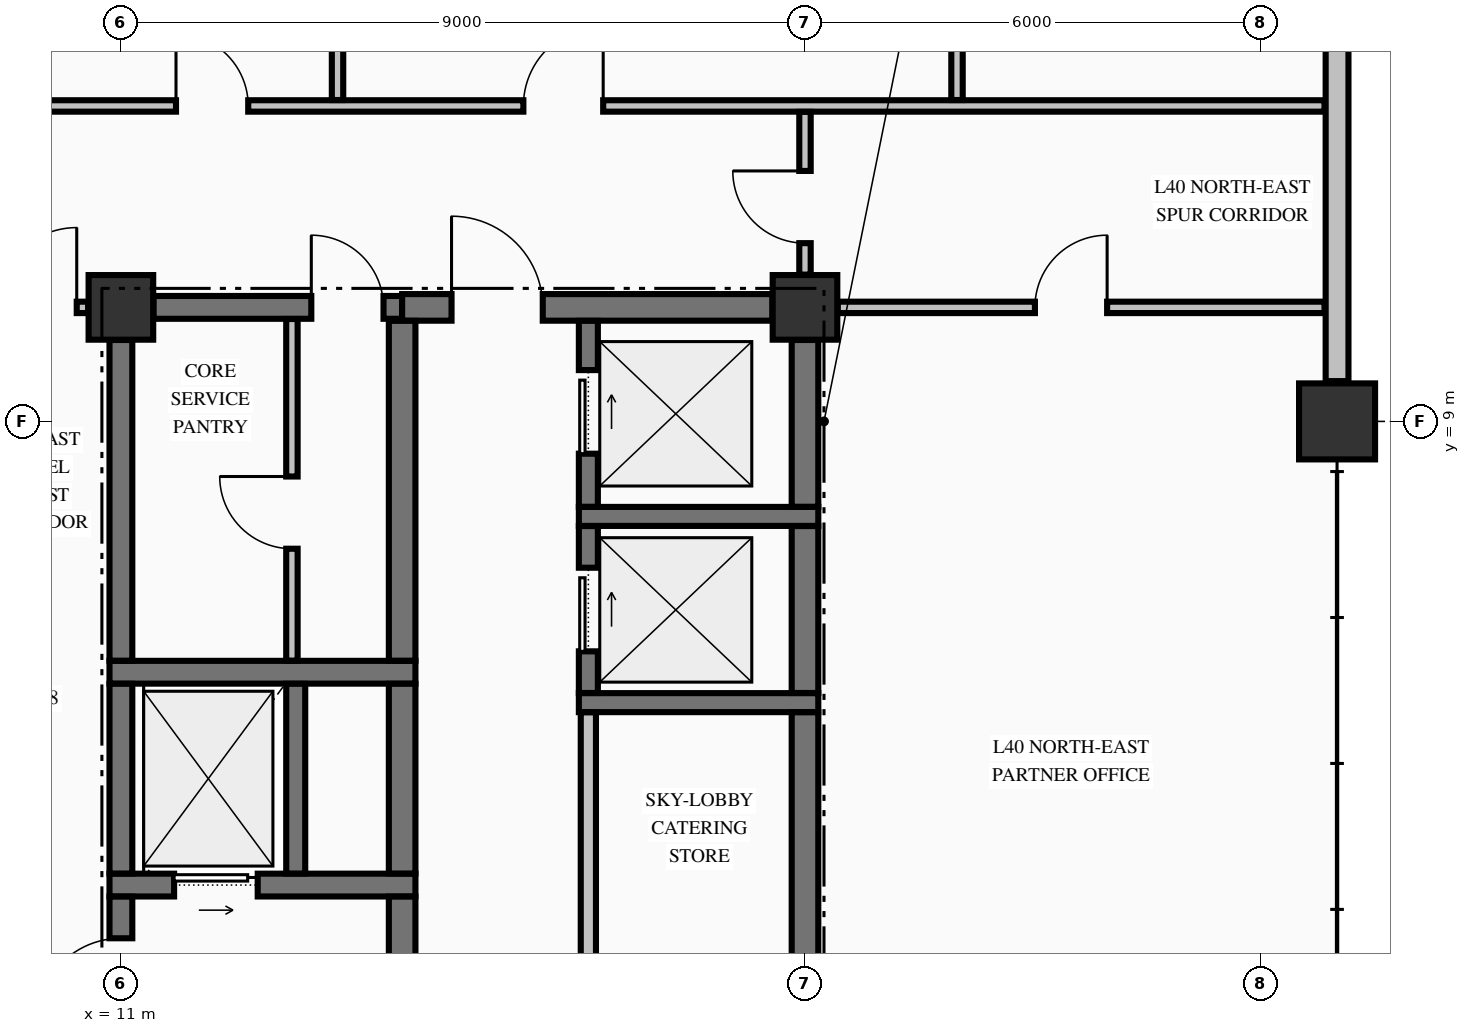
"""IFC4 building model, lengths in metres.
Left out: names, types, materials, properties, quantities, classifications, styles, units other than length and angle.
Written with IfcOpenShell. Run it as: python <this file> out.ifc"""

import sys

from ifc_helpers import new_model, si_unit, direction, frame, frame_2d, origin, origin_2d, place, context, subcontext, project, spatial, rectangle, extrude, element, fill, save


model = new_model("IFC4")
c1 = context("Model", 3, precision=1e-05, world=origin(), true_north=direction((0.0, 1.0)))
c2 = subcontext(c1, "Body", "Model", "MODEL_VIEW")
j1 = project(units=[si_unit("LENGTHUNIT", "METRE"), si_unit("PLANEANGLEUNIT", "RADIAN")], contexts=[c1])
p1 = place(None, origin())
s1 = spatial("IfcSite", under=j1, at=p1, CompositionType="ELEMENT")
p2 = place(p1, origin())
s2 = spatial("IfcBuilding", under=s1, at=p2, CompositionType="ELEMENT")
p3 = place(p2, frame((0.0, 0.0, 158.24)))
s3 = spatial("IfcBuildingStorey", under=s2, at=p3, CompositionType="ELEMENT", Elevation=158.24)
p4 = place(p3, frame((27.0, 9.0, -0.425), z_axis=(0.0, 0.0, 1.0), x_axis=(1.0, 0.0, 0.0)))
e1 = element("IfcColumn", 1, at=p4, inside=s3, PredefinedType="COLUMN", context=c2, shape_type="SweptSolid", body=[
    extrude(rectangle(XDim=1.0, YDim=1.0, at=origin_2d()), origin(), (0.0, 0.0, 1.0), 4.595),
])
for number, where, z_axis, x_axis in (
    (2, (11.0, 10.5, -0.425), (0.0, 0.0, 1.0), (1.0, 0.0, 0.0)),
    (3, (20.0, 10.5, -0.425), (0.0, 0.0, 1.0), (1.0, 0.0, 0.0)),
):
    element("IfcColumn", number, at=place(p3, frame(where, z_axis=z_axis, x_axis=x_axis)), inside=s3, PredefinedType="COLUMN", context=c2, shape_type="SweptSolid", body=[
        extrude(rectangle(XDim=0.85, YDim=0.85, at=origin_2d()), origin(), (0.0, 0.0, 1.0), 4.595),
    ])
p5 = place(p3, frame((27.0, 9.53, 0.0), z_axis=(0.0, 0.0, 1.0), x_axis=(0.0, 1.0, 0.0)))
e4 = element("IfcWall", 4, at=p5, inside=s3, PredefinedType="STANDARD", context=c2, shape_type="SweptSolid", body=[
    extrude(rectangle(XDim=9.44, YDim=0.3, at=frame_2d((4.72, 0.0))), origin(), (0.0, 0.0, 1.0), 1.962),
])
p6 = place(p3, frame((10.85, 2.9, 0.0), z_axis=(0.0, 0.0, 1.0), x_axis=(1.0, 0.0, 0.0)))
e5 = element("IfcWall", 5, at=p6, inside=s3, PredefinedType="SHEAR", context=c2, shape_type="SweptSolid", body=[
    extrude(rectangle(XDim=4.025, YDim=0.3, at=frame_2d((2.012, 0.0))), origin(), (0.0, 0.0, 1.0), 4.17),
])
p7 = place(p6, frame((0.85, 0.0, 0.0)))
e6 = element("IfcOpeningElement", 6, at=p7, cuts=e5, PredefinedType="OPENING", context=c2, shape_type="SweptSolid", body=[
    extrude(rectangle(XDim=1.1, YDim=2.2, at=frame_2d((0.55, 1.1))), frame((0.0, 0.16, 0.0), z_axis=(0.0, -1.0, 0.0), x_axis=(1.0, 0.0, 0.0)), (0.0, 0.0, 1.0), 0.32),
])
p8 = place(p3, frame((17.025, 5.3, 0.0), z_axis=(0.0, 0.0, 1.0), x_axis=(1.0, 0.0, 0.0)))
e7 = element("IfcWall", 7, at=p8, inside=s3, PredefinedType="SOLIDWALL", context=c2, shape_type="SweptSolid", body=[
    extrude(rectangle(XDim=3.15, YDim=0.25, at=frame_2d((1.575, 0.0))), origin(), (0.0, 0.0, 1.0), 4.17),
])
p9 = place(p3, frame((10.85, 5.7, 0.0), z_axis=(0.0, 0.0, 1.0), x_axis=(1.0, 0.0, 0.0)))
e8 = element("IfcWall", 8, at=p9, inside=s3, PredefinedType="SHEAR", context=c2, shape_type="SweptSolid", body=[
    extrude(rectangle(XDim=4.025, YDim=0.3, at=frame_2d((2.012, 0.0))), origin(), (0.0, 0.0, 1.0), 4.17),
])
p10 = place(p3, frame((17.025, 7.75, 0.0), z_axis=(0.0, 0.0, 1.0), x_axis=(1.0, 0.0, 0.0)))
e9 = element("IfcWall", 9, at=p10, inside=s3, PredefinedType="SOLIDWALL", context=c2, shape_type="SweptSolid", body=[
    extrude(rectangle(XDim=3.15, YDim=0.25, at=frame_2d((1.575, 0.0))), origin(), (0.0, 0.0, 1.0), 4.17),
])
p11 = place(p3, frame((11.429, 10.5, 0.0), z_axis=(0.0, 0.0, 1.0), x_axis=(1.0, 0.0, 0.0)))
e10 = element("IfcWall", 10, at=p11, inside=s3, PredefinedType="SHEAR", context=c2, shape_type="SweptSolid", body=[
    extrude(rectangle(XDim=3.271, YDim=0.3, at=frame_2d((1.635, 0.0))), origin(), (0.0, 0.0, 1.0), 4.17),
])
p12 = place(p11, frame((2.076, 0.0, 0.0)))
e11 = element("IfcOpeningElement", 11, at=p12, cuts=e10, PredefinedType="OPENING", context=c2, shape_type="SweptSolid", body=[
    extrude(rectangle(XDim=0.95, YDim=2.15, at=frame_2d((0.475, 1.075))), frame((0.0, 0.16, 0.0), z_axis=(0.0, -1.0, 0.0), x_axis=(1.0, 0.0, 0.0)), (0.0, 0.0, 1.0), 0.32),
])
p13 = place(p3, frame((14.7, 10.5, 0.0), z_axis=(0.0, 0.0, 1.0), x_axis=(1.0, 0.0, 0.0)))
e12 = element("IfcWall", 12, at=p13, inside=s3, PredefinedType="SHEAR", context=c2, shape_type="SweptSolid", body=[
    extrude(rectangle(XDim=4.871, YDim=0.35, at=frame_2d((2.436, 0.0))), origin(), (0.0, 0.0, 1.0), 4.17),
])
p14 = place(p13, frame((0.65, 0.0, 0.0)))
e13 = element("IfcOpeningElement", 13, at=p14, cuts=e12, PredefinedType="OPENING", context=c2, shape_type="SweptSolid", body=[
    extrude(rectangle(XDim=1.2, YDim=2.15, at=frame_2d((0.6, 1.075))), frame((0.0, 0.185, 0.0), z_axis=(0.0, -1.0, 0.0), x_axis=(1.0, 0.0, 0.0)), (0.0, 0.0, 1.0), 0.37),
])
p15 = place(p3, frame((-10.569, 10.5, 0.0), z_axis=(0.0, 0.0, 1.0), x_axis=(1.0, 0.0, 0.0)))
e14 = element("IfcWall", 14, at=p15, inside=s3, PredefinedType="PARTITIONING", context=c2, shape_type="SweptSolid", body=[
    extrude(rectangle(XDim=21.138, YDim=0.15, at=frame_2d((10.569, 0.0))), origin(), (0.0, 0.0, 1.0), 4.17),
])
p16 = place(p15, frame((0.15, 0.0, 0.0)))
e15 = element("IfcOpeningElement", 15, at=p16, cuts=e14, PredefinedType="OPENING", context=c2, shape_type="SweptSolid", body=[
    extrude(rectangle(XDim=1.05, YDim=2.15, at=frame_2d((0.525, 1.075))), frame((0.0, 0.085, 0.0), z_axis=(0.0, -1.0, 0.0), x_axis=(1.0, 0.0, 0.0)), (0.0, 0.0, 1.0), 0.17),
])
p17 = place(p15, frame((19.938, 0.0, 0.0)))
e16 = element("IfcOpeningElement", 16, at=p17, cuts=e14, PredefinedType="OPENING", context=c2, shape_type="SweptSolid", body=[
    extrude(rectangle(XDim=1.05, YDim=2.15, at=frame_2d((0.525, 1.075))), frame((0.0, 0.085, 0.0), z_axis=(0.0, -1.0, 0.0), x_axis=(1.0, 0.0, 0.0)), (0.0, 0.0, 1.0), 0.17),
])
p18 = place(p3, frame((20.431, 10.5, 0.0), z_axis=(0.0, 0.0, 1.0), x_axis=(1.0, 0.0, 0.0)))
e17 = element("IfcWall", 17, at=p18, inside=s3, PredefinedType="PARTITIONING", context=c2, shape_type="SweptSolid", body=[
    extrude(rectangle(XDim=6.404, YDim=0.15, at=frame_2d((3.202, 0.0))), origin(), (0.0, 0.0, 1.0), 4.17),
])
p19 = place(p18, frame((2.594, 0.0, 0.0)))
e18 = element("IfcOpeningElement", 18, at=p19, cuts=e17, PredefinedType="OPENING", context=c2, shape_type="SweptSolid", body=[
    extrude(rectangle(XDim=0.95, YDim=2.15, at=frame_2d((0.475, 1.075))), frame((0.0, 0.085, 0.0), z_axis=(0.0, -1.0, 0.0), x_axis=(1.0, 0.0, 0.0)), (0.0, 0.0, 1.0), 0.17),
])
p20 = place(p3, frame((-20.075, 13.15, 0.0), z_axis=(0.0, 0.0, 1.0), x_axis=(1.0, 0.0, 0.0)))
e19 = element("IfcWall", 19, at=p20, inside=s3, PredefinedType="PARTITIONING", context=c2, shape_type="SweptSolid", body=[
    extrude(rectangle(XDim=46.91, YDim=0.15, at=frame_2d((23.455, 0.0))), origin(), (0.0, 0.0, 1.0), 4.17),
])
p21 = place(p20, frame((11.75, 0.0, 0.0)))
e20 = element("IfcOpeningElement", 20, at=p21, cuts=e19, PredefinedType="OPENING", context=c2, shape_type="SweptSolid", body=[
    extrude(rectangle(XDim=1.05, YDim=2.15, at=frame_2d((0.525, 1.075))), frame((0.0, 0.085, 0.0), z_axis=(0.0, -1.0, 0.0), x_axis=(1.0, 0.0, 0.0)), (0.0, 0.0, 1.0), 0.17),
])
p22 = place(p20, frame((16.45, 0.0, 0.0)))
e21 = element("IfcOpeningElement", 21, at=p22, cuts=e19, PredefinedType="OPENING", context=c2, shape_type="SweptSolid", body=[
    extrude(rectangle(XDim=0.95, YDim=2.15, at=frame_2d((0.475, 1.075))), frame((0.0, 0.085, 0.0), z_axis=(0.0, -1.0, 0.0), x_axis=(1.0, 0.0, 0.0)), (0.0, 0.0, 1.0), 0.17),
])
p23 = place(p20, frame((22.95, 0.0, 0.0)))
e22 = element("IfcOpeningElement", 22, at=p23, cuts=e19, PredefinedType="OPENING", context=c2, shape_type="SweptSolid", body=[
    extrude(rectangle(XDim=0.95, YDim=2.15, at=frame_2d((0.475, 1.075))), frame((0.0, 0.085, 0.0), z_axis=(0.0, -1.0, 0.0), x_axis=(1.0, 0.0, 0.0)), (0.0, 0.0, 1.0), 0.17),
])
p24 = place(p20, frame((31.8, 0.0, 0.0)))
e23 = element("IfcOpeningElement", 23, at=p24, cuts=e19, PredefinedType="OPENING", context=c2, shape_type="SweptSolid", body=[
    extrude(rectangle(XDim=0.95, YDim=2.15, at=frame_2d((0.475, 1.075))), frame((0.0, 0.085, 0.0), z_axis=(0.0, -1.0, 0.0), x_axis=(1.0, 0.0, 0.0)), (0.0, 0.0, 1.0), 0.17),
])
p25 = place(p20, frame((36.37, 0.0, 0.0)))
e24 = element("IfcOpeningElement", 24, at=p25, cuts=e19, PredefinedType="OPENING", context=c2, shape_type="SweptSolid", body=[
    extrude(rectangle(XDim=1.05, YDim=2.15, at=frame_2d((0.525, 1.075))), frame((0.0, 0.085, 0.0), z_axis=(0.0, -1.0, 0.0), x_axis=(1.0, 0.0, 0.0)), (0.0, 0.0, 1.0), 0.17),
])
p26 = place(p3, frame((11.0, 0.429, 0.0), z_axis=(0.0, 0.0, 1.0), x_axis=(0.0, 1.0, 0.0)))
e25 = element("IfcWall", 25, at=p26, inside=s3, PredefinedType="SHEAR", context=c2, shape_type="SweptSolid", body=[
    extrude(rectangle(XDim=2.319, YDim=0.3, at=frame_2d((1.16, 0.0))), origin(), (0.0, 0.0, 1.0), 4.17),
])
p27 = place(p26, frame((0.671, 0.0, 0.0)))
e26 = element("IfcOpeningElement", 26, at=p27, cuts=e25, PredefinedType="OPENING", context=c2, shape_type="SweptSolid", body=[
    extrude(rectangle(XDim=1.1, YDim=2.15, at=frame_2d((0.55, 1.075))), frame((0.0, 0.16, 0.0), z_axis=(0.0, -1.0, 0.0), x_axis=(1.0, 0.0, 0.0)), (0.0, 0.0, 1.0), 0.32),
])
p28 = place(p3, frame((11.0, 3.052, 0.0), z_axis=(0.0, 0.0, 1.0), x_axis=(0.0, 1.0, 0.0)))
e27 = element("IfcWall", 27, at=p28, inside=s3, PredefinedType="SHEAR", context=c2, shape_type="SweptSolid", body=[
    extrude(rectangle(XDim=2.496, YDim=0.3, at=frame_2d((1.248, 0.0))), origin(), (0.0, 0.0, 1.0), 4.17),
])
p29 = place(p3, frame((11.0, 5.852, 0.0), z_axis=(0.0, 0.0, 1.0), x_axis=(0.0, 1.0, 0.0)))
e28 = element("IfcWall", 28, at=p29, inside=s3, PredefinedType="SHEAR", context=c2, shape_type="SweptSolid", body=[
    extrude(rectangle(XDim=4.219, YDim=0.3, at=frame_2d((2.109, 0.0))), origin(), (0.0, 0.0, 1.0), 4.17),
])
p30 = place(p3, frame((13.3, 3.052, 0.0), z_axis=(0.0, 0.0, 1.0), x_axis=(0.0, 1.0, 0.0)))
e29 = element("IfcWall", 29, at=p30, inside=s3, PredefinedType="SOLIDWALL", context=c2, shape_type="SweptSolid", body=[
    extrude(rectangle(XDim=2.496, YDim=0.25, at=frame_2d((1.248, 0.0))), origin(), (0.0, 0.0, 1.0), 4.17),
])
p31 = place(p3, frame((14.7, -0.098, 0.0), z_axis=(0.0, 0.0, 1.0), x_axis=(0.0, 1.0, 0.0)))
e30 = element("IfcWall", 30, at=p31, inside=s3, PredefinedType="SHEAR", context=c2, shape_type="SweptSolid", body=[
    extrude(rectangle(XDim=2.846, YDim=0.35, at=frame_2d((1.423, 0.0))), origin(), (0.0, 0.0, 1.0), 4.17),
])
p32 = place(p3, frame((14.7, 3.052, 0.0), z_axis=(0.0, 0.0, 1.0), x_axis=(0.0, 1.0, 0.0)))
e31 = element("IfcWall", 31, at=p32, inside=s3, PredefinedType="SHEAR", context=c2, shape_type="SweptSolid", body=[
    extrude(rectangle(XDim=2.496, YDim=0.35, at=frame_2d((1.248, 0.0))), origin(), (0.0, 0.0, 1.0), 4.17),
])
p33 = place(p3, frame((14.7, 5.852, 0.0), z_axis=(0.0, 0.0, 1.0), x_axis=(0.0, 1.0, 0.0)))
e32 = element("IfcWall", 32, at=p33, inside=s3, PredefinedType="SHEAR", context=c2, shape_type="SweptSolid", body=[
    extrude(rectangle(XDim=4.471, YDim=0.35, at=frame_2d((2.235, 0.0))), origin(), (0.0, 0.0, 1.0), 4.17),
])
p34 = place(p3, frame((17.15, 5.427, 0.0), z_axis=(0.0, 0.0, 1.0), x_axis=(0.0, 1.0, 0.0)))
e33 = element("IfcWall", 33, at=p34, inside=s3, PredefinedType="SOLIDWALL", context=c2, shape_type="SweptSolid", body=[
    extrude(rectangle(XDim=2.196, YDim=0.25, at=frame_2d((1.098, 0.0))), origin(), (0.0, 0.0, 1.0), 4.17),
])
p35 = place(p34, frame((0.548, 0.0, 0.0)))
e34 = element("IfcOpeningElement", 34, at=p35, cuts=e33, PredefinedType="OPENING", context=c2, shape_type="SweptSolid", body=[
    extrude(rectangle(XDim=1.1, YDim=2.2, at=frame_2d((0.55, 1.1))), frame((0.0, 0.135, 0.0), z_axis=(0.0, -1.0, 0.0), x_axis=(1.0, 0.0, 0.0)), (0.0, 0.0, 1.0), 0.27),
])
p36 = place(p3, frame((17.15, 7.877, 0.0), z_axis=(0.0, 0.0, 1.0), x_axis=(0.0, 1.0, 0.0)))
e35 = element("IfcWall", 35, at=p36, inside=s3, PredefinedType="SOLIDWALL", context=c2, shape_type="SweptSolid", body=[
    extrude(rectangle(XDim=2.446, YDim=0.25, at=frame_2d((1.223, 0.0))), origin(), (0.0, 0.0, 1.0), 4.17),
])
p37 = place(p36, frame((0.698, 0.0, 0.0)))
e36 = element("IfcOpeningElement", 36, at=p37, cuts=e35, PredefinedType="OPENING", context=c2, shape_type="SweptSolid", body=[
    extrude(rectangle(XDim=1.1, YDim=2.2, at=frame_2d((0.55, 1.1))), frame((0.0, 0.135, 0.0), z_axis=(0.0, -1.0, 0.0), x_axis=(1.0, 0.0, 0.0)), (0.0, 0.0, 1.0), 0.27),
])
p38 = place(p3, frame((20.0, 0.429, 0.0), z_axis=(0.0, 0.0, 1.0), x_axis=(0.0, 1.0, 0.0)))
e37 = element("IfcWall", 37, at=p38, inside=s3, PredefinedType="SHEAR", context=c2, shape_type="SweptSolid", body=[
    extrude(rectangle(XDim=4.744, YDim=0.35, at=frame_2d((2.372, 0.0))), origin(), (0.0, 0.0, 1.0), 4.17),
])
p39 = place(p3, frame((20.0, 5.427, 0.0), z_axis=(0.0, 0.0, 1.0), x_axis=(0.0, 1.0, 0.0)))
e38 = element("IfcWall", 38, at=p39, inside=s3, PredefinedType="SHEAR", context=c2, shape_type="SweptSolid", body=[
    extrude(rectangle(XDim=2.196, YDim=0.35, at=frame_2d((1.098, 0.0))), origin(), (0.0, 0.0, 1.0), 4.17),
])
p40 = place(p3, frame((20.0, 7.877, 0.0), z_axis=(0.0, 0.0, 1.0), x_axis=(0.0, 1.0, 0.0)))
e39 = element("IfcWall", 39, at=p40, inside=s3, PredefinedType="SHEAR", context=c2, shape_type="SweptSolid", body=[
    extrude(rectangle(XDim=2.194, YDim=0.35, at=frame_2d((1.097, 0.0))), origin(), (0.0, 0.0, 1.0), 4.17),
])
p41 = place(p3, frame((13.25, 5.853, 0.0), z_axis=(0.0, 0.0, 1.0), x_axis=(0.0, 1.0, 0.0)))
e40 = element("IfcWall", 40, at=p41, inside=s3, PredefinedType="PARTITIONING", context=c2, shape_type="SweptSolid", body=[
    extrude(rectangle(XDim=4.494, YDim=0.15, at=frame_2d((2.247, 0.0))), origin(), (0.0, 0.0, 1.0), 4.17),
])
p42 = place(p41, frame((1.472, 0.0, 0.0)))
e41 = element("IfcOpeningElement", 41, at=p42, cuts=e40, PredefinedType="OPENING", context=c2, shape_type="SweptSolid", body=[
    extrude(rectangle(XDim=0.95, YDim=2.15, at=frame_2d((0.475, 1.075))), frame((0.0, 0.085, 0.0), z_axis=(0.0, -1.0, 0.0), x_axis=(1.0, 0.0, 0.0)), (0.0, 0.0, 1.0), 0.17),
])
p43 = place(p3, frame((13.85, 13.228, 0.0), z_axis=(0.0, 0.0, 1.0), x_axis=(0.0, 1.0, 0.0)))
e42 = element("IfcWall", 42, at=p43, inside=s3, PredefinedType="PARTITIONING", context=c2, shape_type="SweptSolid", body=[
    extrude(rectangle(XDim=11.107, YDim=0.15, at=frame_2d((5.553, 0.0))), origin(), (0.0, 0.0, 1.0), 4.17),
])
p44 = place(p3, frame((17.15, -4.422, 0.0), z_axis=(0.0, 0.0, 1.0), x_axis=(0.0, 1.0, 0.0)))
e43 = element("IfcWall", 43, at=p44, inside=s3, PredefinedType="PARTITIONING", context=c2, shape_type="SweptSolid", body=[
    extrude(rectangle(XDim=9.594, YDim=0.2, at=frame_2d((4.797, 0.0))), origin(), (0.0, 0.0, 1.0), 4.17),
])
p45 = place(p44, frame((4.347, 0.0, 0.0)))
e44 = element("IfcOpeningElement", 44, at=p45, cuts=e43, PredefinedType="OPENING", context=c2, shape_type="SweptSolid", body=[
    extrude(rectangle(XDim=0.95, YDim=2.15, at=frame_2d((0.475, 1.075))), frame((0.0, 0.11, 0.0), z_axis=(0.0, -1.0, 0.0), x_axis=(1.0, 0.0, 0.0)), (0.0, 0.0, 1.0), 0.22),
])
p46 = place(p3, frame((20.0, 10.931, 0.0), z_axis=(0.0, 0.0, 1.0), x_axis=(0.0, 1.0, 0.0)))
e45 = element("IfcWall", 45, at=p46, inside=s3, PredefinedType="PARTITIONING", context=c2, shape_type="SweptSolid", body=[
    extrude(rectangle(XDim=2.141, YDim=0.15, at=frame_2d((1.071, 0.0))), origin(), (0.0, 0.0, 1.0), 3.36),
])
p47 = place(p46, frame((0.414, 0.0, 0.0)))
e46 = element("IfcOpeningElement", 46, at=p47, cuts=e45, PredefinedType="OPENING", context=c2, shape_type="SweptSolid", body=[
    extrude(rectangle(XDim=0.95, YDim=2.15, at=frame_2d((0.475, 1.075))), frame((0.0, 0.085, 0.0), z_axis=(0.0, -1.0, 0.0), x_axis=(1.0, 0.0, 0.0)), (0.0, 0.0, 1.0), 0.17),
])
p48 = place(p3, frame((22.0, 13.228, 0.0), z_axis=(0.0, 0.0, 1.0), x_axis=(0.0, 1.0, 0.0)))
e47 = element("IfcWall", 47, at=p48, inside=s3, PredefinedType="PARTITIONING", context=c2, shape_type="SweptSolid", body=[
    extrude(rectangle(XDim=5.766, YDim=0.15, at=frame_2d((2.883, 0.0))), origin(), (0.0, 0.0, 1.0), 4.17),
])
p49 = place(p27, origin())
e48 = element("IfcDoor", 48, at=p49, inside=s3, OperationType="SINGLE_SWING_LEFT", PredefinedType="DOOR", context=c2, shape_type="SweptSolid", body=[
    extrude(rectangle(XDim=1.1, YDim=2.15, at=frame_2d((0.55, 1.075))), frame((0.0, 0.025, 0.0), z_axis=(0.0, -1.0, 0.0), x_axis=(1.0, 0.0, 0.0)), (0.0, 0.0, 1.0), 0.05),
])
fill(e26, e48)
p50 = place(p7, origin())
e49 = element("IfcDoor", 49, at=p50, inside=s3, OperationType="SLIDING_TO_RIGHT", PredefinedType="DOOR", context=c2, shape_type="SweptSolid", body=[
    extrude(rectangle(XDim=1.1, YDim=2.2, at=frame_2d((0.55, 1.1))), frame((0.0, 0.025, 0.0), z_axis=(0.0, -1.0, 0.0), x_axis=(1.0, 0.0, 0.0)), (0.0, 0.0, 1.0), 0.05),
])
fill(e6, e49)
p51 = place(p12, origin())
e50 = element("IfcDoor", 50, at=p51, inside=s3, OperationType="SINGLE_SWING_LEFT", PredefinedType="DOOR", context=c2, shape_type="SweptSolid", body=[
    extrude(rectangle(XDim=0.95, YDim=2.15, at=frame_2d((0.475, 1.075))), frame((0.0, 0.025, 0.0), z_axis=(0.0, -1.0, 0.0), x_axis=(1.0, 0.0, 0.0)), (0.0, 0.0, 1.0), 0.05),
])
fill(e11, e50)
p52 = place(p42, origin())
e51 = element("IfcDoor", 51, at=p52, inside=s3, OperationType="SINGLE_SWING_RIGHT", PredefinedType="DOOR", context=c2, shape_type="SweptSolid", body=[
    extrude(rectangle(XDim=0.95, YDim=2.15, at=frame_2d((0.475, 1.075))), frame((0.0, 0.025, 0.0), z_axis=(0.0, -1.0, 0.0), x_axis=(1.0, 0.0, 0.0)), (0.0, 0.0, 1.0), 0.05),
])
fill(e41, e51)
p53 = place(p35, origin())
e52 = element("IfcDoor", 52, at=p53, inside=s3, OperationType="SLIDING_TO_RIGHT", PredefinedType="DOOR", context=c2, shape_type="SweptSolid", body=[
    extrude(rectangle(XDim=1.1, YDim=2.2, at=frame_2d((0.55, 1.1))), frame((0.0, 0.025, 0.0), z_axis=(0.0, -1.0, 0.0), x_axis=(1.0, 0.0, 0.0)), (0.0, 0.0, 1.0), 0.05),
])
fill(e34, e52)
p54 = place(p37, origin())
e53 = element("IfcDoor", 53, at=p54, inside=s3, OperationType="SLIDING_TO_RIGHT", PredefinedType="DOOR", context=c2, shape_type="SweptSolid", body=[
    extrude(rectangle(XDim=1.1, YDim=2.2, at=frame_2d((0.55, 1.1))), frame((0.0, 0.025, 0.0), z_axis=(0.0, -1.0, 0.0), x_axis=(1.0, 0.0, 0.0)), (0.0, 0.0, 1.0), 0.05),
])
fill(e36, e53)
p55 = place(p14, origin())
e54 = element("IfcDoor", 54, at=p55, inside=s3, OperationType="SINGLE_SWING_LEFT", PredefinedType="DOOR", context=c2, shape_type="SweptSolid", body=[
    extrude(rectangle(XDim=1.2, YDim=2.15, at=frame_2d((0.6, 1.075))), frame((0.0, 0.025, 0.0), z_axis=(0.0, -1.0, 0.0), x_axis=(1.0, 0.0, 0.0)), (0.0, 0.0, 1.0), 0.05),
])
fill(e13, e54)
p56 = place(p17, origin())
e55 = element("IfcDoor", 55, at=p56, inside=s3, OperationType="SINGLE_SWING_RIGHT", PredefinedType="DOOR", context=c2, shape_type="SweptSolid", body=[
    extrude(rectangle(XDim=1.05, YDim=2.15, at=frame_2d((0.525, 1.075))), frame((0.0, 0.025, 0.0), z_axis=(0.0, -1.0, 0.0), x_axis=(1.0, 0.0, 0.0)), (0.0, 0.0, 1.0), 0.05),
])
fill(e16, e55)
p57 = place(p24, origin())
e56 = element("IfcDoor", 56, at=p57, inside=s3, OperationType="SINGLE_SWING_LEFT", PredefinedType="DOOR", context=c2, shape_type="SweptSolid", body=[
    extrude(rectangle(XDim=0.95, YDim=2.15, at=frame_2d((0.475, 1.075))), frame((0.0, 0.025, 0.0), z_axis=(0.0, -1.0, 0.0), x_axis=(1.0, 0.0, 0.0)), (0.0, 0.0, 1.0), 0.05),
])
fill(e23, e56)
p58 = place(p25, origin())
e57 = element("IfcDoor", 57, at=p58, inside=s3, OperationType="SINGLE_SWING_RIGHT", PredefinedType="DOOR", context=c2, shape_type="SweptSolid", body=[
    extrude(rectangle(XDim=1.05, YDim=2.15, at=frame_2d((0.525, 1.075))), frame((0.0, 0.025, 0.0), z_axis=(0.0, -1.0, 0.0), x_axis=(1.0, 0.0, 0.0)), (0.0, 0.0, 1.0), 0.05),
])
fill(e24, e57)
p59 = place(p47, origin())
e58 = element("IfcDoor", 58, at=p59, inside=s3, OperationType="SINGLE_SWING_RIGHT", PredefinedType="DOOR", context=c2, shape_type="SweptSolid", body=[
    extrude(rectangle(XDim=0.95, YDim=2.15, at=frame_2d((0.475, 1.075))), frame((0.0, 0.025, 0.0), z_axis=(0.0, -1.0, 0.0), x_axis=(1.0, 0.0, 0.0)), (0.0, 0.0, 1.0), 0.05),
])
fill(e46, e58)
p60 = place(p19, origin())
e59 = element("IfcDoor", 59, at=p60, inside=s3, OperationType="SINGLE_SWING_RIGHT", PredefinedType="DOOR", context=c2, shape_type="SweptSolid", body=[
    extrude(rectangle(XDim=0.95, YDim=2.15, at=frame_2d((0.475, 1.075))), frame((0.0, 0.025, 0.0), z_axis=(0.0, -1.0, 0.0), x_axis=(1.0, 0.0, 0.0)), (0.0, 0.0, 1.0), 0.05),
])
fill(e18, e59)
save(model, sys.argv[1])
